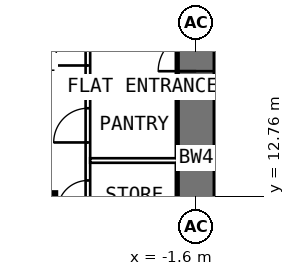
"""IFC4 building model, lengths in metres.
Left out: names, types, materials, properties, quantities, classifications, styles, units other than length and angle.
Written with IfcOpenShell. Run it as: python <this file> out.ifc"""

import sys

from ifc_helpers import new_model, si_unit, direction, frame, frame_2d, origin, origin_2d, place, context, subcontext, project, spatial, rectangle, extrude, element, fill, save


model = new_model("IFC4")
c1 = context("Model", 3, precision=1e-05, world=origin(), true_north=direction((0.0, 1.0)))
c2 = subcontext(c1, "Body", "Model", "MODEL_VIEW")
j1 = project(units=[si_unit("LENGTHUNIT", "METRE"), si_unit("PLANEANGLEUNIT", "RADIAN")], contexts=[c1])
p1 = place(None, origin())
s1 = spatial("IfcSite", under=j1, at=p1, CompositionType="ELEMENT")
p2 = place(p1, origin())
s2 = spatial("IfcBuilding", under=s1, at=p2, CompositionType="ELEMENT")
p3 = place(p2, frame((0.0, 0.0, 64.6)))
s3 = spatial("IfcBuildingStorey", under=s2, at=p3, CompositionType="ELEMENT", Elevation=64.6)
p4 = place(p3, frame((-5.9, 12.25, 0.0), z_axis=(0.0, 0.0, 1.0), x_axis=(0.0, 1.0, 0.0)))
e1 = element("IfcColumn", 1, at=p4, inside=s3, PredefinedType="COLUMN", context=c2, shape_type="SweptSolid", body=[
    extrude(rectangle(XDim=1.2, YDim=1.2, at=origin_2d()), origin(), (0.0, 0.0, 1.0), 3.6),
])
p5 = place(p3, frame((-1.6, 9.6, 0.0), z_axis=(0.0, 0.0, 1.0), x_axis=(0.0, 1.0, 0.0)))
e2 = element("IfcWall", 2, at=p5, inside=s3, PredefinedType="SHEAR", context=c2, shape_type="SweptSolid", body=[
    extrude(rectangle(XDim=8.35, YDim=1.0, at=frame_2d((4.175, 0.0))), origin(), (0.0, 0.0, 1.0), 3.6),
])
p6 = place(p5, frame((6.45, 0.0, 0.0)))
e3 = element("IfcOpeningElement", 3, at=p6, cuts=e2, PredefinedType="OPENING", context=c2, shape_type="SweptSolid", body=[
    extrude(rectangle(XDim=1.0, YDim=2.1, at=frame_2d((0.5, 1.05))), frame((0.0, 0.512, 0.0), z_axis=(0.0, -1.0, 0.0), x_axis=(1.0, 0.0, 0.0)), (0.0, 0.0, 1.0), 1.024),
])
p7 = place(p3, frame((-4.45, 10.1, 0.0), z_axis=(0.0, 0.0, 1.0), x_axis=(0.0, 1.0, 0.0)))
e4 = element("IfcWall", 4, at=p7, inside=s3, PredefinedType="PARTITIONING", context=c2, shape_type="SweptSolid", body=[
    extrude(rectangle(XDim=14.65, YDim=0.12, at=frame_2d((7.325, 0.0))), origin(), (0.0, 0.0, 1.0), 3.35),
])
p8 = place(p7, frame((0.375, 0.0, 0.0)))
e5 = element("IfcOpeningElement", 5, at=p8, cuts=e4, PredefinedType="OPENING", context=c2, shape_type="SweptSolid", body=[
    extrude(rectangle(XDim=0.9, YDim=2.1, at=frame_2d((0.45, 1.05))), frame((0.0, 0.072, 0.0), z_axis=(0.0, -1.0, 0.0), x_axis=(1.0, 0.0, 0.0)), (0.0, 0.0, 1.0), 0.144),
])
p9 = place(p7, frame((2.275, 0.0, 0.0)))
e6 = element("IfcOpeningElement", 6, at=p9, cuts=e4, PredefinedType="OPENING", context=c2, shape_type="SweptSolid", body=[
    extrude(rectangle(XDim=0.8, YDim=2.1, at=frame_2d((0.4, 1.05))), frame((0.0, 0.072, 0.0), z_axis=(0.0, -1.0, 0.0), x_axis=(1.0, 0.0, 0.0)), (0.0, 0.0, 1.0), 0.144),
])
p10 = place(p7, frame((4.075, 0.0, 0.0)))
e7 = element("IfcOpeningElement", 7, at=p10, cuts=e4, PredefinedType="OPENING", context=c2, shape_type="SweptSolid", body=[
    extrude(rectangle(XDim=0.9, YDim=2.1, at=frame_2d((0.45, 1.05))), frame((0.0, 0.072, 0.0), z_axis=(0.0, -1.0, 0.0), x_axis=(1.0, 0.0, 0.0)), (0.0, 0.0, 1.0), 0.144),
])
p11 = place(p7, frame((6.1, 0.0, 0.0)))
e8 = element("IfcOpeningElement", 8, at=p11, cuts=e4, PredefinedType="OPENING", context=c2, shape_type="SweptSolid", body=[
    extrude(rectangle(XDim=0.9, YDim=2.1, at=frame_2d((0.45, 1.05))), frame((0.0, 0.072, 0.0), z_axis=(0.0, -1.0, 0.0), x_axis=(1.0, 0.0, 0.0)), (0.0, 0.0, 1.0), 0.144),
])
p12 = place(p7, frame((8.729, 0.0, 0.0)))
e9 = element("IfcOpeningElement", 9, at=p12, cuts=e4, PredefinedType="OPENING", context=c2, shape_type="SweptSolid", body=[
    extrude(rectangle(XDim=0.8, YDim=2.1, at=frame_2d((0.4, 1.05))), frame((0.0, 0.072, 0.0), z_axis=(0.0, -1.0, 0.0), x_axis=(1.0, 0.0, 0.0)), (0.0, 0.0, 1.0), 0.144),
])
p13 = place(p7, frame((11.193, 0.0, 0.0)))
e10 = element("IfcOpeningElement", 10, at=p13, cuts=e4, PredefinedType="OPENING", context=c2, shape_type="SweptSolid", body=[
    extrude(rectangle(XDim=0.8, YDim=2.1, at=frame_2d((0.4, 1.05))), frame((0.0, 0.072, 0.0), z_axis=(0.0, -1.0, 0.0), x_axis=(1.0, 0.0, 0.0)), (0.0, 0.0, 1.0), 0.144),
])
p14 = place(p7, frame((13.114, 0.0, 0.0)))
e11 = element("IfcOpeningElement", 11, at=p14, cuts=e4, PredefinedType="OPENING", context=c2, shape_type="SweptSolid", body=[
    extrude(rectangle(XDim=0.9, YDim=2.1, at=frame_2d((0.45, 1.05))), frame((0.0, 0.072, 0.0), z_axis=(0.0, -1.0, 0.0), x_axis=(1.0, 0.0, 0.0)), (0.0, 0.0, 1.0), 0.144),
])
for number, where, z_axis, x_axis in (
    (12, (-2.1, 13.7, 0.0), (0.0, 0.0, 1.0), (-1.0, 0.0, 0.0)),
    (13, (-2.1, 15.55, 0.0), (0.0, 0.0, 1.0), (-1.0, 0.0, 0.0)),
):
    element("IfcWall", number, at=place(p3, frame(where, z_axis=z_axis, x_axis=x_axis)), inside=s3, PredefinedType="PARTITIONING", context=c2, shape_type="SweptSolid", body=[
        extrude(rectangle(XDim=2.29, YDim=0.12, at=frame_2d((1.145, 0.0))), origin(), (0.0, 0.0, 1.0), 3.35),
    ])
p15 = place(p6, origin())
e14 = element("IfcDoor", 14, at=p15, inside=s3, OperationType="SINGLE_SWING_LEFT", PredefinedType="DOOR", context=c2, shape_type="SweptSolid", body=[
    extrude(rectangle(XDim=1.0, YDim=2.1, at=frame_2d((0.5, 1.05))), frame((0.0, 0.25, 0.0), z_axis=(0.0, -1.0, 0.0), x_axis=(1.0, 0.0, 0.0)), (0.0, 0.0, 1.0), 0.5),
])
fill(e3, e14)
p16 = place(p9, origin())
e15 = element("IfcDoor", 15, at=p16, inside=s3, OperationType="SINGLE_SWING_LEFT", PredefinedType="DOOR", context=c2, shape_type="SweptSolid", body=[
    extrude(rectangle(XDim=0.8, YDim=2.1, at=frame_2d((0.4, 1.05))), frame((0.0, 0.025, 0.0), z_axis=(0.0, -1.0, 0.0), x_axis=(1.0, 0.0, 0.0)), (0.0, 0.0, 1.0), 0.05),
])
fill(e6, e15)
p17 = place(p10, origin())
e16 = element("IfcDoor", 16, at=p17, inside=s3, OperationType="SINGLE_SWING_LEFT", PredefinedType="DOOR", context=c2, shape_type="SweptSolid", body=[
    extrude(rectangle(XDim=0.9, YDim=2.1, at=frame_2d((0.45, 1.05))), frame((0.0, 0.025, 0.0), z_axis=(0.0, -1.0, 0.0), x_axis=(1.0, 0.0, 0.0)), (0.0, 0.0, 1.0), 0.05),
])
fill(e7, e16)
p18 = place(p11, origin())
e17 = element("IfcDoor", 17, at=p18, inside=s3, OperationType="SINGLE_SWING_LEFT", PredefinedType="DOOR", context=c2, shape_type="SweptSolid", body=[
    extrude(rectangle(XDim=0.9, YDim=2.1, at=frame_2d((0.45, 1.05))), frame((0.0, 0.025, 0.0), z_axis=(0.0, -1.0, 0.0), x_axis=(1.0, 0.0, 0.0)), (0.0, 0.0, 1.0), 0.05),
])
fill(e8, e17)
save(model, sys.argv[1])
